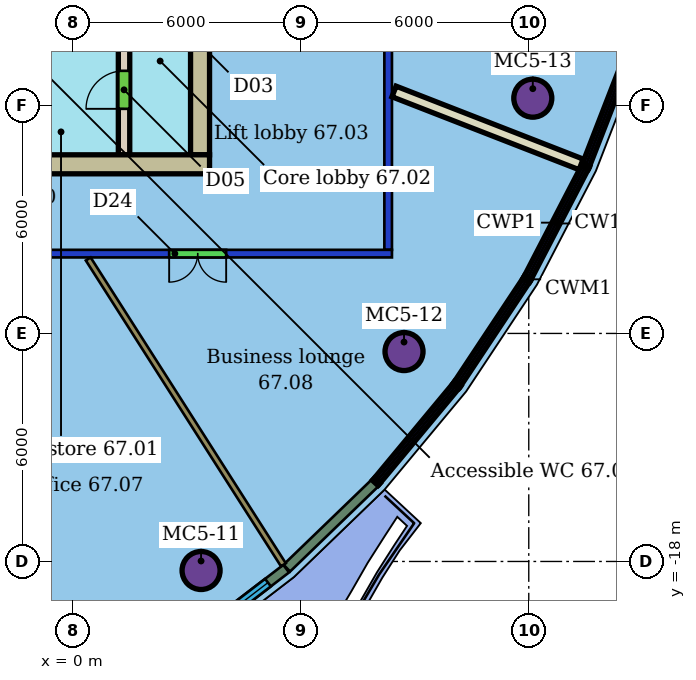
"""IFC4 building model, lengths in metres.
Left out: names, types, materials, properties, quantities, classifications, styles, units other than length and angle.
Written with IfcOpenShell. Run it as: python <this file> out.ifc"""

import sys

from ifc_helpers import new_model, si_unit, direction, frame, frame_2d, origin, origin_2d, place, context, subcontext, project, spatial, rectangle, hollow_circle, extrude, element, fill, save


model = new_model("IFC4")
c1 = context("Model", 3, precision=1e-05, world=origin(), true_north=direction((0.0, 1.0)))
c2 = subcontext(c1, "Body", "Model", "MODEL_VIEW")
j1 = project(units=[si_unit("LENGTHUNIT", "METRE"), si_unit("PLANEANGLEUNIT", "RADIAN")], contexts=[c1])
p1 = place(None, origin())
s1 = spatial("IfcSite", under=j1, at=p1, CompositionType="ELEMENT")
p2 = place(p1, origin())
s2 = spatial("IfcBuilding", under=s1, at=p2, CompositionType="ELEMENT")
p3 = place(p2, frame((0.0, 0.0, 272.1)))
s3 = spatial("IfcBuildingStorey", under=s2, at=p3, CompositionType="ELEMENT", Elevation=272.1)
for number, where, z_axis, x_axis in (
    (1, (3.377, -18.238, 0.0), (0.0, 0.0, 1.0), (1.0, 0.0, 0.0)),
    (2, (8.718, -12.477, 0.0), (0.0, 0.0, 1.0), (1.0, 0.0, 0.0)),
    (3, (12.106, -5.81, 0.0), (0.0, 0.0, 1.0), (1.0, 0.0, 0.0)),
):
    element("IfcColumn", number, at=place(p3, frame(where, z_axis=z_axis, x_axis=x_axis)), inside=s3, PredefinedType="COLUMN", context=c2, shape_type="SweptSolid", body=[
        extrude(hollow_circle(Radius=0.5, WallThickness=0.04, at=origin_2d()), origin(), (0.0, 0.0, 1.0), 3.45),
    ])
p4 = place(p3, frame((8.4, -9.9, 0.0), z_axis=(0.0, 0.0, 1.0), x_axis=(-1.0, 0.0, 0.0)))
e4 = element("IfcWall", 4, at=p4, inside=s3, PredefinedType="PARTITIONING", context=c2, shape_type="SweptSolid", body=[
    extrude(rectangle(XDim=28.8, YDim=0.2, at=frame_2d((14.4, 0.0))), origin(), (0.0, 0.0, 1.0), 3.1),
])
p5 = place(p4, frame((18.521, 0.0, 0.0)))
e5 = element("IfcOpeningElement", 5, at=p5, cuts=e4, PredefinedType="OPENING", context=c2, shape_type="SweptSolid", body=[
    extrude(rectangle(XDim=1.0, YDim=2.1, at=frame_2d((0.5, 1.05))), frame((0.0, 0.11, 0.0), z_axis=(0.0, -1.0, 0.0), x_axis=(1.0, 0.0, 0.0)), (0.0, 0.0, 1.0), 0.22),
])
p6 = place(p4, frame((14.61, 0.0, 0.0)))
e6 = element("IfcOpeningElement", 6, at=p6, cuts=e4, PredefinedType="OPENING", context=c2, shape_type="SweptSolid", body=[
    extrude(rectangle(XDim=0.9, YDim=2.1, at=frame_2d((0.45, 1.05))), frame((0.0, 0.11, 0.0), z_axis=(0.0, -1.0, 0.0), x_axis=(1.0, 0.0, 0.0)), (0.0, 0.0, 1.0), 0.22),
])
p7 = place(p4, frame((9.347, 0.0, 0.0)))
e7 = element("IfcOpeningElement", 7, at=p7, cuts=e4, PredefinedType="OPENING", context=c2, shape_type="SweptSolid", body=[
    extrude(rectangle(XDim=1.0, YDim=2.1, at=frame_2d((0.5, 1.05))), frame((0.0, 0.11, 0.0), z_axis=(0.0, -1.0, 0.0), x_axis=(1.0, 0.0, 0.0)), (0.0, 0.0, 1.0), 0.22),
])
p8 = place(p4, frame((4.363, 0.0, 0.0)))
e8 = element("IfcOpeningElement", 8, at=p8, cuts=e4, PredefinedType="OPENING", context=c2, shape_type="SweptSolid", body=[
    extrude(rectangle(XDim=1.5, YDim=2.1, at=frame_2d((0.75, 1.05))), frame((0.0, 0.11, 0.0), z_axis=(0.0, -1.0, 0.0), x_axis=(1.0, 0.0, 0.0)), (0.0, 0.0, 1.0), 0.22),
])
p9 = place(p3, frame((8.3, 9.8, 0.0), z_axis=(0.0, 0.0, 1.0), x_axis=(0.0, -1.0, 0.0)))
e9 = element("IfcWall", 9, at=p9, inside=s3, PredefinedType="PARTITIONING", context=c2, shape_type="SweptSolid", body=[
    extrude(rectangle(XDim=19.6, YDim=0.2, at=frame_2d((9.8, 0.0))), origin(), (0.0, 0.0, 1.0), 3.1),
])
p10 = place(p9, frame((7.396, 0.0, 0.0)))
e10 = element("IfcOpeningElement", 10, at=p10, cuts=e9, PredefinedType="OPENING", context=c2, shape_type="SweptSolid", body=[
    extrude(rectangle(XDim=1.8, YDim=2.4, at=frame_2d((0.9, 1.2))), frame((0.0, 0.11, 0.0), z_axis=(0.0, -1.0, 0.0), x_axis=(1.0, 0.0, 0.0)), (0.0, 0.0, 1.0), 0.22),
])
p11 = place(p9, frame((2.153, 0.0, 0.0)))
e11 = element("IfcOpeningElement", 11, at=p11, cuts=e9, PredefinedType="OPENING", context=c2, shape_type="SweptSolid", body=[
    extrude(rectangle(XDim=1.0, YDim=2.4, at=frame_2d((0.5, 1.2))), frame((0.0, 0.11, 0.0), z_axis=(0.0, -1.0, 0.0), x_axis=(1.0, 0.0, 0.0)), (0.0, 0.0, 1.0), 0.22),
])
p12 = place(p3, frame((5.543, -18.088, 0.0), z_axis=(0.0, 0.0, 1.0), x_axis=(-0.537970500941, 0.842963664767, 0.0)))
e12 = element("IfcWall", 12, at=p12, inside=s3, PredefinedType="PARTITIONING", context=c2, shape_type="SweptSolid", body=[
    extrude(rectangle(XDim=9.547, YDim=0.15, at=frame_2d((4.773, 0.0))), origin(), (0.0, 0.0, 1.0), 3.45),
])
p13 = place(p3, frame((13.378, -7.552, 0.0), z_axis=(0.0, 0.0, 1.0), x_axis=(-0.931738210827, 0.363130701656, 0.0)))
e13 = element("IfcWall", 13, at=p13, inside=s3, PredefinedType="PARTITIONING", context=c2, shape_type="SweptSolid", body=[
    extrude(rectangle(XDim=5.284, YDim=0.3, at=frame_2d((2.642, 0.0))), origin(), (0.0, 0.0, 1.0), 3.45),
])
p14 = place(p3, frame((3.073, -20.142, 0.0), z_axis=(0.0, 0.0, 1.0), x_axis=(0.793206691654, 0.608952497586, 0.0)))
e14 = element("IfcWall", 14, at=p14, inside=s3, PredefinedType="SOLIDWALL", context=c2, shape_type="SweptSolid", body=[
    extrude(rectangle(XDim=3.207, YDim=0.25, at=frame_2d((1.603, 0.0))), origin(), (0.0, 0.0, 1.0), 3.15),
])
p15 = place(p14, frame((0.603, 0.0, 0.9)))
e15 = element("IfcOpeningElement", 15, at=p15, cuts=e14, PredefinedType="OPENING", context=c2, shape_type="SweptSolid", body=[
    extrude(rectangle(XDim=2.0, YDim=2.1, at=frame_2d((1.0, 1.05))), frame((0.0, 0.135, 0.0), z_axis=(0.0, -1.0, 0.0), x_axis=(1.0, 0.0, 0.0)), (0.0, 0.0, 1.0), 0.27),
])
p16 = place(p3, frame((5.633, -18.175, 0.0), z_axis=(0.0, 0.0, 1.0), x_axis=(0.719595006307, 0.694393999757, 0.0)))
e16 = element("IfcWall", 16, at=p16, inside=s3, PredefinedType="SOLIDWALL", context=c2, shape_type="SweptSolid", body=[
    extrude(rectangle(XDim=3.216, YDim=0.25, at=frame_2d((1.608, 0.0))), origin(), (0.0, 0.0, 1.0), 3.15),
])
p17 = place(p3, frame((-15.6, -7.55, 0.0), z_axis=(0.0, 0.0, 1.0), x_axis=(1.0, 0.0, 0.0)))
e17 = element("IfcWall", 17, at=p17, inside=s3, PredefinedType="SHEAR", context=c2, shape_type="SweptSolid", body=[
    extrude(rectangle(XDim=19.2, YDim=0.5, at=frame_2d((9.6, 0.0))), origin(), (0.0, 0.0, 1.0), 3.3),
])
p18 = place(p17, frame((3.6, 0.0, 0.0)))
e18 = element("IfcOpeningElement", 18, at=p18, cuts=e17, PredefinedType="OPENING", context=c2, shape_type="SweptSolid", body=[
    extrude(rectangle(XDim=1.2, YDim=2.1, at=frame_2d((0.6, 1.05))), frame((0.0, 0.26, 0.0), z_axis=(0.0, -1.0, 0.0), x_axis=(1.0, 0.0, 0.0)), (0.0, 0.0, 1.0), 0.52),
])
p19 = place(p3, frame((3.35, -7.3, 0.0), z_axis=(0.0, 0.0, 1.0), x_axis=(0.0, 1.0, 0.0)))
e19 = element("IfcWall", 19, at=p19, inside=s3, PredefinedType="SHEAR", context=c2, shape_type="SweptSolid", body=[
    extrude(rectangle(XDim=14.6, YDim=0.5, at=frame_2d((7.3, 0.0))), origin(), (0.0, 0.0, 1.0), 3.3),
])
p20 = place(p19, frame((2.8, 0.0, 0.0)))
e20 = element("IfcOpeningElement", 20, at=p20, cuts=e19, PredefinedType="OPENING", context=c2, shape_type="SweptSolid", body=[
    extrude(rectangle(XDim=1.2, YDim=2.1, at=frame_2d((0.6, 1.05))), frame((0.0, 0.26, 0.0), z_axis=(0.0, -1.0, 0.0), x_axis=(1.0, 0.0, 0.0)), (0.0, 0.0, 1.0), 0.52),
])
p21 = place(p19, frame((10.6, 0.0, 0.0)))
e21 = element("IfcOpeningElement", 21, at=p21, cuts=e19, PredefinedType="OPENING", context=c2, shape_type="SweptSolid", body=[
    extrude(rectangle(XDim=1.2, YDim=2.1, at=frame_2d((0.6, 1.05))), frame((0.0, 0.26, 0.0), z_axis=(0.0, -1.0, 0.0), x_axis=(1.0, 0.0, 0.0)), (0.0, 0.0, 1.0), 0.52),
])
p22 = place(p3, frame((1.35, -7.3, 0.0), z_axis=(0.0, 0.0, 1.0), x_axis=(0.0, 1.0, 0.0)))
e22 = element("IfcWall", 22, at=p22, inside=s3, PredefinedType="SHEAR", context=c2, shape_type="SweptSolid", body=[
    extrude(rectangle(XDim=14.6, YDim=0.3, at=frame_2d((7.3, 0.0))), origin(), (0.0, 0.0, 1.0), 3.3),
])
p23 = place(p22, frame((1.21, 0.0, 0.0)))
e23 = element("IfcOpeningElement", 23, at=p23, cuts=e22, PredefinedType="OPENING", context=c2, shape_type="SweptSolid", body=[
    extrude(rectangle(XDim=1.0, YDim=2.1, at=frame_2d((0.5, 1.05))), frame((0.0, 0.16, 0.0), z_axis=(0.0, -1.0, 0.0), x_axis=(1.0, 0.0, 0.0)), (0.0, 0.0, 1.0), 0.32),
])
p24 = place(p22, frame((6.55, 0.0, 0.0)))
e24 = element("IfcOpeningElement", 24, at=p24, cuts=e22, PredefinedType="OPENING", context=c2, shape_type="SweptSolid", body=[
    extrude(rectangle(XDim=1.5, YDim=2.1, at=frame_2d((0.75, 1.05))), frame((0.0, 0.16, 0.0), z_axis=(0.0, -1.0, 0.0), x_axis=(1.0, 0.0, 0.0)), (0.0, 0.0, 1.0), 0.32),
])
p25 = place(p8, origin())
e25 = element("IfcDoor", 25, at=p25, inside=s3, OperationType="DOUBLE_DOOR_SINGLE_SWING", PredefinedType="DOOR", context=c2, shape_type="SweptSolid", body=[
    extrude(rectangle(XDim=1.5, YDim=2.1, at=frame_2d((0.75, 1.05))), frame((0.0, 0.025, 0.0), z_axis=(0.0, -1.0, 0.0), x_axis=(1.0, 0.0, 0.0)), (0.0, 0.0, 1.0), 0.05),
])
fill(e8, e25)
p26 = place(p15, origin())
e26 = element("IfcWindow", 26, at=p26, inside=s3, PartitioningType="SINGLE_PANEL", PredefinedType="WINDOW", context=c2, shape_type="SweptSolid", body=[
    extrude(rectangle(XDim=2.0, YDim=2.1, at=frame_2d((1.0, 1.05))), frame((0.0, 0.03, 0.0), z_axis=(0.0, -1.0, 0.0), x_axis=(1.0, 0.0, 0.0)), (0.0, 0.0, 1.0), 0.06),
])
fill(e15, e26)
p27 = place(p23, origin())
e27 = element("IfcDoor", 27, at=p27, inside=s3, OperationType="SINGLE_SWING_LEFT", PredefinedType="NOTDEFINED", context=c2, shape_type="SweptSolid", body=[
    extrude(rectangle(XDim=1.0, YDim=2.1, at=frame_2d((0.5, 1.05))), frame((0.0, 0.025, 0.0), z_axis=(0.0, -1.0, 0.0), x_axis=(1.0, 0.0, 0.0)), (0.0, 0.0, 1.0), 0.05),
])
fill(e23, e27)
save(model, sys.argv[1])
